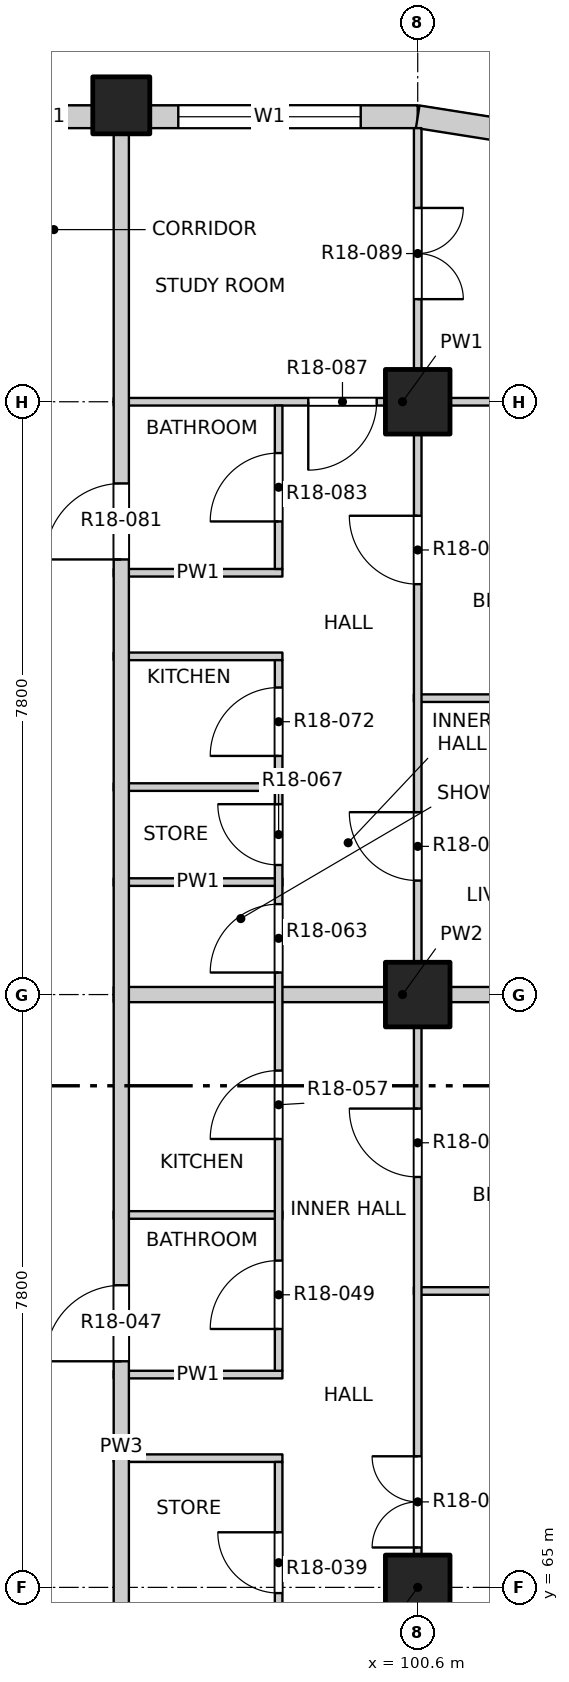
"""IFC4 building model, lengths in metres.
Left out: names, types, materials, properties, quantities, classifications, styles, units other than length and angle.
Written with IfcOpenShell. Run it as: python <this file> out.ifc"""

import sys

from ifc_helpers import new_model, si_unit, direction, frame, frame_2d, origin, origin_2d, place, context, subcontext, project, spatial, rectangle, extrude, element, fill, save


model = new_model("IFC4")
c1 = context("Model", 3, precision=1e-05, world=origin(), true_north=direction((0.0, 1.0)))
c2 = subcontext(c1, "Body", "Model", "MODEL_VIEW")
j1 = project(units=[si_unit("LENGTHUNIT", "METRE"), si_unit("PLANEANGLEUNIT", "RADIAN")], contexts=[c1])
p1 = place(None, origin())
s1 = spatial("IfcSite", under=j1, at=p1, CompositionType="ELEMENT")
p2 = place(p1, origin())
s2 = spatial("IfcBuilding", under=s1, at=p2, CompositionType="ELEMENT")
p3 = place(p2, frame((0.0, 0.0, 186.0)))
s3 = spatial("IfcBuildingStorey", under=s2, at=p3, CompositionType="ELEMENT", Elevation=186.0)
p4 = place(p3, frame((96.7, 84.5, -0.25), z_axis=(0.0, 0.0, 1.0), x_axis=(1.0, 0.0, 0.0)))
e1 = element("IfcColumn", 1, at=p4, inside=s3, PredefinedType="COLUMN", context=c2, shape_type="SweptSolid", body=[
    extrude(rectangle(XDim=0.75, YDim=0.75, at=origin_2d()), origin(), (0.0, 0.0, 1.0), 3.4),
])
for number, where, z_axis, x_axis in (
    (2, (100.6, 65.0, -0.25), (0.0, 0.0, 1.0), (1.0, 0.0, 0.0)),
    (3, (100.6, 72.8, -0.25), (0.0, 0.0, 1.0), (1.0, 0.0, 0.0)),
    (4, (100.6, 80.6, -0.25), (0.0, 0.0, 1.0), (1.0, 0.0, 0.0)),
):
    element("IfcColumn", number, at=place(p3, frame(where, z_axis=z_axis, x_axis=x_axis)), inside=s3, PredefinedType="COLUMN", context=c2, shape_type="SweptSolid", body=[
        extrude(rectangle(XDim=0.85, YDim=0.85, at=origin_2d()), origin(), (0.0, 0.0, 1.0), 3.4),
    ])
p5 = place(p3, frame((95.025, 84.35, 0.0), z_axis=(0.0, 0.0, 1.0), x_axis=(1.0, 0.0, 0.0)))
e5 = element("IfcWall", 5, at=p5, inside=s3, PredefinedType="SOLIDWALL", context=c2, shape_type="SweptSolid", body=[
    extrude(rectangle(XDim=1.3, YDim=0.3, at=frame_2d((0.65, 0.0))), origin(), (0.0, 0.0, 1.0), 2.7),
])
p6 = place(p3, frame((97.075, 84.35, 0.0), z_axis=(0.0, 0.0, 1.0), x_axis=(1.0, 0.0, 0.0)))
e6 = element("IfcWall", 6, at=p6, inside=s3, PredefinedType="SOLIDWALL", context=c2, shape_type="SweptSolid", body=[
    extrude(rectangle(XDim=3.525, YDim=0.3, at=frame_2d((1.763, 0.0))), origin(), (0.0, 0.0, 1.0), 2.7),
])
p7 = place(p6, frame((0.375, 0.0, 0.9)))
e7 = element("IfcOpeningElement", 7, at=p7, cuts=e6, PredefinedType="OPENING", context=c2, shape_type="SweptSolid", body=[
    extrude(rectangle(XDim=2.4, YDim=1.8, at=frame_2d((1.2, 0.9))), frame((0.0, 0.16, 0.0), z_axis=(0.0, -1.0, 0.0), x_axis=(1.0, 0.0, 0.0)), (0.0, 0.0, 1.0), 0.32),
])
p8 = place(p3, frame((101.759, 84.167, 0.0), z_axis=(0.0, 0.0, 1.0), x_axis=(-0.987678452879, 0.156496880861, 0.0)))
e8 = element("IfcWall", 8, at=p8, inside=s3, PredefinedType="SOLIDWALL", context=c2, shape_type="SweptSolid", body=[
    extrude(rectangle(XDim=1.173, YDim=0.3, at=frame_2d((0.586, 0.0))), origin(), (0.0, 0.0, 1.0), 2.7),
])
for number, where, z_axis, x_axis in (
    (9, (96.6, 66.7, 0.0), (0.0, 0.0, 1.0), (1.0, 0.0, 0.0)),
    (10, (96.6, 67.8, 0.0), (0.0, 0.0, 1.0), (1.0, 0.0, 0.0)),
):
    element("IfcWall", number, at=place(p3, frame(where, z_axis=z_axis, x_axis=x_axis)), inside=s3, PredefinedType="PARTITIONING", context=c2, shape_type="SweptSolid", body=[
        extrude(rectangle(XDim=2.22, YDim=0.1, at=frame_2d((1.11, 0.0))), origin(), (0.0, 0.0, 1.0), 3.15),
    ])
p9 = place(p3, frame((100.55, 68.9, 0.0), z_axis=(0.0, 0.0, 1.0), x_axis=(1.0, 0.0, 0.0)))
e11 = element("IfcWall", 11, at=p9, inside=s3, PredefinedType="PARTITIONING", context=c2, shape_type="SweptSolid", body=[
    extrude(rectangle(XDim=3.65, YDim=0.1, at=frame_2d((1.825, 0.0))), origin(), (0.0, 0.0, 1.0), 2.55),
])
p10 = place(p3, frame((96.6, 69.9, 0.0), z_axis=(0.0, 0.0, 1.0), x_axis=(1.0, 0.0, 0.0)))
e12 = element("IfcWall", 12, at=p10, inside=s3, PredefinedType="PARTITIONING", context=c2, shape_type="SweptSolid", body=[
    extrude(rectangle(XDim=2.22, YDim=0.1, at=frame_2d((1.11, 0.0))), origin(), (0.0, 0.0, 1.0), 3.15),
])
p11 = place(p3, frame((96.6, 72.8, 0.0), z_axis=(0.0, 0.0, 1.0), x_axis=(1.0, 0.0, 0.0)))
e13 = element("IfcWall", 13, at=p11, inside=s3, PredefinedType="PARTITIONING", context=c2, shape_type="SweptSolid", body=[
    extrude(rectangle(XDim=7.6, YDim=0.2, at=frame_2d((3.8, 0.0))), origin(), (0.0, 0.0, 1.0), 3.15),
])
for number, where, z_axis, x_axis in (
    (14, (96.6, 74.28, 0.0), (0.0, 0.0, 1.0), (1.0, 0.0, 0.0)),
    (15, (96.6, 75.53, 0.0), (0.0, 0.0, 1.0), (1.0, 0.0, 0.0)),
):
    element("IfcWall", number, at=place(p3, frame(where, z_axis=z_axis, x_axis=x_axis)), inside=s3, PredefinedType="PARTITIONING", context=c2, shape_type="SweptSolid", body=[
        extrude(rectangle(XDim=2.22, YDim=0.1, at=frame_2d((1.11, 0.0))), origin(), (0.0, 0.0, 1.0), 3.15),
    ])
p12 = place(p3, frame((100.55, 76.7, 0.0), z_axis=(0.0, 0.0, 1.0), x_axis=(1.0, 0.0, 0.0)))
e16 = element("IfcWall", 16, at=p12, inside=s3, PredefinedType="PARTITIONING", context=c2, shape_type="SweptSolid", body=[
    extrude(rectangle(XDim=3.65, YDim=0.1, at=frame_2d((1.825, 0.0))), origin(), (0.0, 0.0, 1.0), 2.55),
])
for number, where, z_axis, x_axis in (
    (17, (96.6, 77.25, 0.0), (0.0, 0.0, 1.0), (1.0, 0.0, 0.0)),
    (18, (96.6, 78.35, 0.0), (0.0, 0.0, 1.0), (1.0, 0.0, 0.0)),
):
    element("IfcWall", number, at=place(p3, frame(where, z_axis=z_axis, x_axis=x_axis)), inside=s3, PredefinedType="PARTITIONING", context=c2, shape_type="SweptSolid", body=[
        extrude(rectangle(XDim=2.22, YDim=0.1, at=frame_2d((1.11, 0.0))), origin(), (0.0, 0.0, 1.0), 3.15),
    ])
p13 = place(p3, frame((96.6, 80.6, 0.0), z_axis=(0.0, 0.0, 1.0), x_axis=(1.0, 0.0, 0.0)))
e19 = element("IfcWall", 19, at=p13, inside=s3, PredefinedType="PARTITIONING", context=c2, shape_type="SweptSolid", body=[
    extrude(rectangle(XDim=7.6, YDim=0.1, at=frame_2d((3.8, 0.0))), origin(), (0.0, 0.0, 1.0), 3.15),
])
p14 = place(p13, frame((2.56, 0.0, 0.0)))
e20 = element("IfcOpeningElement", 20, at=p14, cuts=e19, PredefinedType="OPENING", context=c2, shape_type="SweptSolid", body=[
    extrude(rectangle(XDim=0.9, YDim=2.1, at=frame_2d((0.45, 1.05))), frame((0.0, 0.06, 0.0), z_axis=(0.0, -1.0, 0.0), x_axis=(1.0, 0.0, 0.0)), (0.0, 0.0, 1.0), 0.12),
])
p15 = place(p3, frame((96.7, 49.5, 0.0), z_axis=(0.0, 0.0, 1.0), x_axis=(0.0, 1.0, 0.0)))
e21 = element("IfcWall", 21, at=p15, inside=s3, PredefinedType="PARTITIONING", context=c2, shape_type="SweptSolid", body=[
    extrude(rectangle(XDim=34.7, YDim=0.2, at=frame_2d((17.35, 0.0))), origin(), (0.0, 0.0, 1.0), 3.15),
])
p16 = place(p15, frame((7.425, 0.0, 0.0)))
e22 = element("IfcOpeningElement", 22, at=p16, cuts=e21, PredefinedType="OPENING", context=c2, shape_type="SweptSolid", body=[
    extrude(rectangle(XDim=1.0, YDim=2.1, at=frame_2d((0.5, 1.05))), frame((0.0, 0.11, 0.0), z_axis=(0.0, -1.0, 0.0), x_axis=(1.0, 0.0, 0.0)), (0.0, 0.0, 1.0), 0.22),
])
p17 = place(p15, frame((18.475, 0.0, 0.0)))
e23 = element("IfcOpeningElement", 23, at=p17, cuts=e21, PredefinedType="OPENING", context=c2, shape_type="SweptSolid", body=[
    extrude(rectangle(XDim=1.0, YDim=2.1, at=frame_2d((0.5, 1.05))), frame((0.0, 0.11, 0.0), z_axis=(0.0, -1.0, 0.0), x_axis=(1.0, 0.0, 0.0)), (0.0, 0.0, 1.0), 0.22),
])
p18 = place(p15, frame((29.025, 0.0, 0.0)))
e24 = element("IfcOpeningElement", 24, at=p18, cuts=e21, PredefinedType="OPENING", context=c2, shape_type="SweptSolid", body=[
    extrude(rectangle(XDim=1.0, YDim=2.1, at=frame_2d((0.5, 1.05))), frame((0.0, 0.11, 0.0), z_axis=(0.0, -1.0, 0.0), x_axis=(1.0, 0.0, 0.0)), (0.0, 0.0, 1.0), 0.22),
])
p19 = place(p3, frame((98.77, 56.8, 0.0), z_axis=(0.0, 0.0, 1.0), x_axis=(0.0, 1.0, 0.0)))
e25 = element("IfcWall", 25, at=p19, inside=s3, PredefinedType="PARTITIONING", context=c2, shape_type="SweptSolid", body=[
    extrude(rectangle(XDim=9.85, YDim=0.1, at=frame_2d((4.925, 0.0))), origin(), (0.0, 0.0, 1.0), 3.15),
])
p20 = place(p19, frame((0.675, 0.0, 0.0)))
e26 = element("IfcOpeningElement", 26, at=p20, cuts=e25, PredefinedType="OPENING", context=c2, shape_type="SweptSolid", body=[
    extrude(rectangle(XDim=0.8, YDim=2.1, at=frame_2d((0.4, 1.05))), frame((0.0, 0.06, 0.0), z_axis=(0.0, -1.0, 0.0), x_axis=(1.0, 0.0, 0.0)), (0.0, 0.0, 1.0), 0.12),
])
p21 = place(p19, frame((2.8, 0.0, 0.0)))
e27 = element("IfcOpeningElement", 27, at=p21, cuts=e25, PredefinedType="OPENING", context=c2, shape_type="SweptSolid", body=[
    extrude(rectangle(XDim=0.9, YDim=2.1, at=frame_2d((0.45, 1.05))), frame((0.0, 0.06, 0.0), z_axis=(0.0, -1.0, 0.0), x_axis=(1.0, 0.0, 0.0)), (0.0, 0.0, 1.0), 0.12),
])
p22 = place(p19, frame((5.325, 0.0, 0.0)))
e28 = element("IfcOpeningElement", 28, at=p22, cuts=e25, PredefinedType="OPENING", context=c2, shape_type="SweptSolid", body=[
    extrude(rectangle(XDim=0.8, YDim=2.1, at=frame_2d((0.4, 1.05))), frame((0.0, 0.06, 0.0), z_axis=(0.0, -1.0, 0.0), x_axis=(1.0, 0.0, 0.0)), (0.0, 0.0, 1.0), 0.12),
])
p23 = place(p19, frame((8.125, 0.0, 0.0)))
e29 = element("IfcOpeningElement", 29, at=p23, cuts=e25, PredefinedType="OPENING", context=c2, shape_type="SweptSolid", body=[
    extrude(rectangle(XDim=0.8, YDim=2.1, at=frame_2d((0.4, 1.05))), frame((0.0, 0.06, 0.0), z_axis=(0.0, -1.0, 0.0), x_axis=(1.0, 0.0, 0.0)), (0.0, 0.0, 1.0), 0.12),
])
p24 = place(p3, frame((98.77, 67.85, 0.0), z_axis=(0.0, 0.0, 1.0), x_axis=(0.0, 1.0, 0.0)))
e30 = element("IfcWall", 30, at=p24, inside=s3, PredefinedType="PARTITIONING", context=c2, shape_type="SweptSolid", body=[
    extrude(rectangle(XDim=9.35, YDim=0.1, at=frame_2d((4.675, 0.0))), origin(), (0.0, 0.0, 1.0), 3.15),
])
p25 = place(p24, frame((0.55, 0.0, 0.0)))
e31 = element("IfcOpeningElement", 31, at=p25, cuts=e30, PredefinedType="OPENING", context=c2, shape_type="SweptSolid", body=[
    extrude(rectangle(XDim=0.9, YDim=2.1, at=frame_2d((0.45, 1.05))), frame((0.0, 0.06, 0.0), z_axis=(0.0, -1.0, 0.0), x_axis=(1.0, 0.0, 0.0)), (0.0, 0.0, 1.0), 0.12),
])
p26 = place(p24, frame((3.05, 0.0, 0.0)))
e32 = element("IfcOpeningElement", 32, at=p26, cuts=e30, PredefinedType="OPENING", context=c2, shape_type="SweptSolid", body=[
    extrude(rectangle(XDim=0.9, YDim=2.1, at=frame_2d((0.45, 1.05))), frame((0.0, 0.06, 0.0), z_axis=(0.0, -1.0, 0.0), x_axis=(1.0, 0.0, 0.0)), (0.0, 0.0, 1.0), 0.12),
])
p27 = place(p24, frame((5.24, 0.0, 0.0)))
e33 = element("IfcOpeningElement", 33, at=p27, cuts=e30, PredefinedType="OPENING", context=c2, shape_type="SweptSolid", body=[
    extrude(rectangle(XDim=0.9, YDim=2.1, at=frame_2d((0.45, 1.05))), frame((0.0, 0.06, 0.0), z_axis=(0.0, -1.0, 0.0), x_axis=(1.0, 0.0, 0.0)), (0.0, 0.0, 1.0), 0.12),
])
p28 = place(p24, frame((6.655, 0.0, 0.0)))
e34 = element("IfcOpeningElement", 34, at=p28, cuts=e30, PredefinedType="OPENING", context=c2, shape_type="SweptSolid", body=[
    extrude(rectangle(XDim=0.8, YDim=2.1, at=frame_2d((0.4, 1.05))), frame((0.0, 0.06, 0.0), z_axis=(0.0, -1.0, 0.0), x_axis=(1.0, 0.0, 0.0)), (0.0, 0.0, 1.0), 0.12),
])
p29 = place(p24, frame((8.09, 0.0, 0.0)))
e35 = element("IfcOpeningElement", 35, at=p29, cuts=e30, PredefinedType="OPENING", context=c2, shape_type="SweptSolid", body=[
    extrude(rectangle(XDim=0.9, YDim=2.1, at=frame_2d((0.45, 1.05))), frame((0.0, 0.06, 0.0), z_axis=(0.0, -1.0, 0.0), x_axis=(1.0, 0.0, 0.0)), (0.0, 0.0, 1.0), 0.12),
])
p30 = place(p3, frame((98.77, 78.4, 0.0), z_axis=(0.0, 0.0, 1.0), x_axis=(0.0, 1.0, 0.0)))
e36 = element("IfcWall", 36, at=p30, inside=s3, PredefinedType="PARTITIONING", context=c2, shape_type="SweptSolid", body=[
    extrude(rectangle(XDim=2.15, YDim=0.1, at=frame_2d((1.075, 0.0))), origin(), (0.0, 0.0, 1.0), 3.15),
])
p31 = place(p30, frame((0.625, 0.0, 0.0)))
e37 = element("IfcOpeningElement", 37, at=p31, cuts=e36, PredefinedType="OPENING", context=c2, shape_type="SweptSolid", body=[
    extrude(rectangle(XDim=0.9, YDim=2.1, at=frame_2d((0.45, 1.05))), frame((0.0, 0.06, 0.0), z_axis=(0.0, -1.0, 0.0), x_axis=(1.0, 0.0, 0.0)), (0.0, 0.0, 1.0), 0.12),
])
p32 = place(p3, frame((100.6, 45.8, 0.0), z_axis=(0.0, 0.0, 1.0), x_axis=(0.0, 1.0, 0.0)))
e38 = element("IfcWall", 38, at=p32, inside=s3, PredefinedType="PARTITIONING", context=c2, shape_type="SweptSolid", body=[
    extrude(rectangle(XDim=38.4, YDim=0.1, at=frame_2d((19.2, 0.0))), origin(), (0.0, 0.0, 1.0), 3.15),
])
p33 = place(p32, frame((1.05, 0.0, 0.0)))
e39 = element("IfcOpeningElement", 39, at=p33, cuts=e38, PredefinedType="OPENING", context=c2, shape_type="SweptSolid", body=[
    extrude(rectangle(XDim=1.2, YDim=2.1, at=frame_2d((0.6, 1.05))), frame((0.0, 0.06, 0.0), z_axis=(0.0, -1.0, 0.0), x_axis=(1.0, 0.0, 0.0)), (0.0, 0.0, 1.0), 0.12),
])
p34 = place(p32, frame((5.1, 0.0, 0.0)))
e40 = element("IfcOpeningElement", 40, at=p34, cuts=e38, PredefinedType="OPENING", context=c2, shape_type="SweptSolid", body=[
    extrude(rectangle(XDim=0.9, YDim=2.1, at=frame_2d((0.45, 1.05))), frame((0.0, 0.06, 0.0), z_axis=(0.0, -1.0, 0.0), x_axis=(1.0, 0.0, 0.0)), (0.0, 0.0, 1.0), 0.12),
])
p35 = place(p32, frame((9.0, 0.0, 0.0)))
e41 = element("IfcOpeningElement", 41, at=p35, cuts=e38, PredefinedType="OPENING", context=c2, shape_type="SweptSolid", body=[
    extrude(rectangle(XDim=0.9, YDim=2.1, at=frame_2d((0.45, 1.05))), frame((0.0, 0.06, 0.0), z_axis=(0.0, -1.0, 0.0), x_axis=(1.0, 0.0, 0.0)), (0.0, 0.0, 1.0), 0.12),
])
p36 = place(p32, frame((12.9, 0.0, 0.0)))
e42 = element("IfcOpeningElement", 42, at=p36, cuts=e38, PredefinedType="OPENING", context=c2, shape_type="SweptSolid", body=[
    extrude(rectangle(XDim=0.9, YDim=2.1, at=frame_2d((0.45, 1.05))), frame((0.0, 0.06, 0.0), z_axis=(0.0, -1.0, 0.0), x_axis=(1.0, 0.0, 0.0)), (0.0, 0.0, 1.0), 0.12),
])
p37 = place(p32, frame((19.725, 0.0, 0.0)))
e43 = element("IfcOpeningElement", 43, at=p37, cuts=e38, PredefinedType="OPENING", context=c2, shape_type="SweptSolid", body=[
    extrude(rectangle(XDim=1.2, YDim=2.1, at=frame_2d((0.6, 1.05))), frame((0.0, 0.06, 0.0), z_axis=(0.0, -1.0, 0.0), x_axis=(1.0, 0.0, 0.0)), (0.0, 0.0, 1.0), 0.12),
])
p38 = place(p32, frame((24.6, 0.0, 0.0)))
e44 = element("IfcOpeningElement", 44, at=p38, cuts=e38, PredefinedType="OPENING", context=c2, shape_type="SweptSolid", body=[
    extrude(rectangle(XDim=0.9, YDim=2.1, at=frame_2d((0.45, 1.05))), frame((0.0, 0.06, 0.0), z_axis=(0.0, -1.0, 0.0), x_axis=(1.0, 0.0, 0.0)), (0.0, 0.0, 1.0), 0.12),
])
p39 = place(p32, frame((28.5, 0.0, 0.0)))
e45 = element("IfcOpeningElement", 45, at=p39, cuts=e38, PredefinedType="OPENING", context=c2, shape_type="SweptSolid", body=[
    extrude(rectangle(XDim=0.9, YDim=2.1, at=frame_2d((0.45, 1.05))), frame((0.0, 0.06, 0.0), z_axis=(0.0, -1.0, 0.0), x_axis=(1.0, 0.0, 0.0)), (0.0, 0.0, 1.0), 0.12),
])
p40 = place(p32, frame((32.4, 0.0, 0.0)))
e46 = element("IfcOpeningElement", 46, at=p40, cuts=e38, PredefinedType="OPENING", context=c2, shape_type="SweptSolid", body=[
    extrude(rectangle(XDim=0.9, YDim=2.1, at=frame_2d((0.45, 1.05))), frame((0.0, 0.06, 0.0), z_axis=(0.0, -1.0, 0.0), x_axis=(1.0, 0.0, 0.0)), (0.0, 0.0, 1.0), 0.12),
])
p41 = place(p32, frame((36.15, 0.0, 0.0)))
e47 = element("IfcOpeningElement", 47, at=p41, cuts=e38, PredefinedType="OPENING", context=c2, shape_type="SweptSolid", body=[
    extrude(rectangle(XDim=1.2, YDim=2.1, at=frame_2d((0.6, 1.05))), frame((0.0, 0.06, 0.0), z_axis=(0.0, -1.0, 0.0), x_axis=(1.0, 0.0, 0.0)), (0.0, 0.0, 1.0), 0.12),
])
p42 = place(p7, origin())
e48 = element("IfcWindow", 48, at=p42, inside=s3, PartitioningType="DOUBLE_PANEL_VERTICAL", PredefinedType="WINDOW", context=c2, shape_type="SweptSolid", body=[
    extrude(rectangle(XDim=2.4, YDim=1.8, at=frame_2d((1.2, 0.9))), frame((0.0, 0.03, 0.0), z_axis=(0.0, -1.0, 0.0), x_axis=(1.0, 0.0, 0.0)), (0.0, 0.0, 1.0), 0.06),
])
fill(e7, e48)
p43 = place(p23, origin())
e49 = element("IfcDoor", 49, at=p43, inside=s3, OperationType="SINGLE_SWING_RIGHT", PredefinedType="DOOR", context=c2, shape_type="SweptSolid", body=[
    extrude(rectangle(XDim=0.8, YDim=2.1, at=frame_2d((0.4, 1.05))), frame((0.0, 0.025, 0.0), z_axis=(0.0, -1.0, 0.0), x_axis=(1.0, 0.0, 0.0)), (0.0, 0.0, 1.0), 0.05),
])
fill(e29, e49)
p44 = place(p37, origin())
e50 = element("IfcDoor", 50, at=p44, inside=s3, OperationType="DOUBLE_DOOR_SINGLE_SWING", PredefinedType="DOOR", context=c2, shape_type="SweptSolid", body=[
    extrude(rectangle(XDim=1.2, YDim=2.1, at=frame_2d((0.6, 1.05))), frame((0.0, 0.025, 0.0), z_axis=(0.0, -1.0, 0.0), x_axis=(1.0, 0.0, 0.0)), (0.0, 0.0, 1.0), 0.05),
])
fill(e43, e50)
p45 = place(p17, origin())
e51 = element("IfcDoor", 51, at=p45, inside=s3, OperationType="SINGLE_SWING_LEFT", PredefinedType="DOOR", context=c2, shape_type="SweptSolid", body=[
    extrude(rectangle(XDim=1.0, YDim=2.1, at=frame_2d((0.5, 1.05))), frame((0.0, 0.025, 0.0), z_axis=(0.0, -1.0, 0.0), x_axis=(1.0, 0.0, 0.0)), (0.0, 0.0, 1.0), 0.05),
])
fill(e23, e51)
p46 = place(p25, origin())
e52 = element("IfcDoor", 52, at=p46, inside=s3, OperationType="SINGLE_SWING_LEFT", PredefinedType="DOOR", context=c2, shape_type="SweptSolid", body=[
    extrude(rectangle(XDim=0.9, YDim=2.1, at=frame_2d((0.45, 1.05))), frame((0.0, 0.025, 0.0), z_axis=(0.0, -1.0, 0.0), x_axis=(1.0, 0.0, 0.0)), (0.0, 0.0, 1.0), 0.05),
])
fill(e31, e52)
p47 = place(p38, origin())
e53 = element("IfcDoor", 53, at=p47, inside=s3, OperationType="SINGLE_SWING_RIGHT", PredefinedType="DOOR", context=c2, shape_type="SweptSolid", body=[
    extrude(rectangle(XDim=0.9, YDim=2.1, at=frame_2d((0.45, 1.05))), frame((0.0, 0.025, 0.0), z_axis=(0.0, -1.0, 0.0), x_axis=(1.0, 0.0, 0.0)), (0.0, 0.0, 1.0), 0.05),
])
fill(e44, e53)
p48 = place(p26, origin())
e54 = element("IfcDoor", 54, at=p48, inside=s3, OperationType="SINGLE_SWING_LEFT", PredefinedType="DOOR", context=c2, shape_type="SweptSolid", body=[
    extrude(rectangle(XDim=0.9, YDim=2.1, at=frame_2d((0.45, 1.05))), frame((0.0, 0.025, 0.0), z_axis=(0.0, -1.0, 0.0), x_axis=(1.0, 0.0, 0.0)), (0.0, 0.0, 1.0), 0.05),
])
fill(e32, e54)
p49 = place(p27, origin())
e55 = element("IfcDoor", 55, at=p49, inside=s3, OperationType="SINGLE_SWING_LEFT", PredefinedType="DOOR", context=c2, shape_type="SweptSolid", body=[
    extrude(rectangle(XDim=0.9, YDim=2.1, at=frame_2d((0.45, 1.05))), frame((0.0, 0.025, 0.0), z_axis=(0.0, -1.0, 0.0), x_axis=(1.0, 0.0, 0.0)), (0.0, 0.0, 1.0), 0.05),
])
fill(e33, e55)
p50 = place(p39, origin())
e56 = element("IfcDoor", 56, at=p50, inside=s3, OperationType="SINGLE_SWING_RIGHT", PredefinedType="DOOR", context=c2, shape_type="SweptSolid", body=[
    extrude(rectangle(XDim=0.9, YDim=2.1, at=frame_2d((0.45, 1.05))), frame((0.0, 0.025, 0.0), z_axis=(0.0, -1.0, 0.0), x_axis=(1.0, 0.0, 0.0)), (0.0, 0.0, 1.0), 0.05),
])
fill(e45, e56)
p51 = place(p28, origin())
e57 = element("IfcDoor", 57, at=p51, inside=s3, OperationType="SINGLE_SWING_RIGHT", PredefinedType="DOOR", context=c2, shape_type="SweptSolid", body=[
    extrude(rectangle(XDim=0.8, YDim=2.1, at=frame_2d((0.4, 1.05))), frame((0.0, 0.025, 0.0), z_axis=(0.0, -1.0, 0.0), x_axis=(1.0, 0.0, 0.0)), (0.0, 0.0, 1.0), 0.05),
])
fill(e34, e57)
p52 = place(p29, origin())
e58 = element("IfcDoor", 58, at=p52, inside=s3, OperationType="SINGLE_SWING_LEFT", PredefinedType="DOOR", context=c2, shape_type="SweptSolid", body=[
    extrude(rectangle(XDim=0.9, YDim=2.1, at=frame_2d((0.45, 1.05))), frame((0.0, 0.025, 0.0), z_axis=(0.0, -1.0, 0.0), x_axis=(1.0, 0.0, 0.0)), (0.0, 0.0, 1.0), 0.05),
])
fill(e35, e58)
p53 = place(p40, origin())
e59 = element("IfcDoor", 59, at=p53, inside=s3, OperationType="SINGLE_SWING_RIGHT", PredefinedType="DOOR", context=c2, shape_type="SweptSolid", body=[
    extrude(rectangle(XDim=0.9, YDim=2.1, at=frame_2d((0.45, 1.05))), frame((0.0, 0.025, 0.0), z_axis=(0.0, -1.0, 0.0), x_axis=(1.0, 0.0, 0.0)), (0.0, 0.0, 1.0), 0.05),
])
fill(e46, e59)
p54 = place(p18, origin())
e60 = element("IfcDoor", 60, at=p54, inside=s3, OperationType="SINGLE_SWING_LEFT", PredefinedType="DOOR", context=c2, shape_type="SweptSolid", body=[
    extrude(rectangle(XDim=1.0, YDim=2.1, at=frame_2d((0.5, 1.05))), frame((0.0, 0.025, 0.0), z_axis=(0.0, -1.0, 0.0), x_axis=(1.0, 0.0, 0.0)), (0.0, 0.0, 1.0), 0.05),
])
fill(e24, e60)
p55 = place(p31, origin())
e61 = element("IfcDoor", 61, at=p55, inside=s3, OperationType="SINGLE_SWING_LEFT", PredefinedType="DOOR", context=c2, shape_type="SweptSolid", body=[
    extrude(rectangle(XDim=0.9, YDim=2.1, at=frame_2d((0.45, 1.05))), frame((0.0, 0.025, 0.0), z_axis=(0.0, -1.0, 0.0), x_axis=(1.0, 0.0, 0.0)), (0.0, 0.0, 1.0), 0.05),
])
fill(e37, e61)
p56 = place(p14, origin())
e62 = element("IfcDoor", 62, at=p56, inside=s3, OperationType="SINGLE_SWING_RIGHT", PredefinedType="DOOR", context=c2, shape_type="SweptSolid", body=[
    extrude(rectangle(XDim=0.9, YDim=2.1, at=frame_2d((0.45, 1.05))), frame((0.0, 0.025, 0.0), z_axis=(0.0, -1.0, 0.0), x_axis=(1.0, 0.0, 0.0)), (0.0, 0.0, 1.0), 0.05),
])
fill(e20, e62)
p57 = place(p41, origin())
e63 = element("IfcDoor", 63, at=p57, inside=s3, OperationType="DOUBLE_DOOR_SINGLE_SWING", PredefinedType="DOOR", context=c2, shape_type="SweptSolid", body=[
    extrude(rectangle(XDim=1.2, YDim=2.1, at=frame_2d((0.6, 1.05))), frame((0.0, 0.025, 0.0), z_axis=(0.0, -1.0, 0.0), x_axis=(1.0, 0.0, 0.0)), (0.0, 0.0, 1.0), 0.05),
])
fill(e47, e63)
save(model, sys.argv[1])
